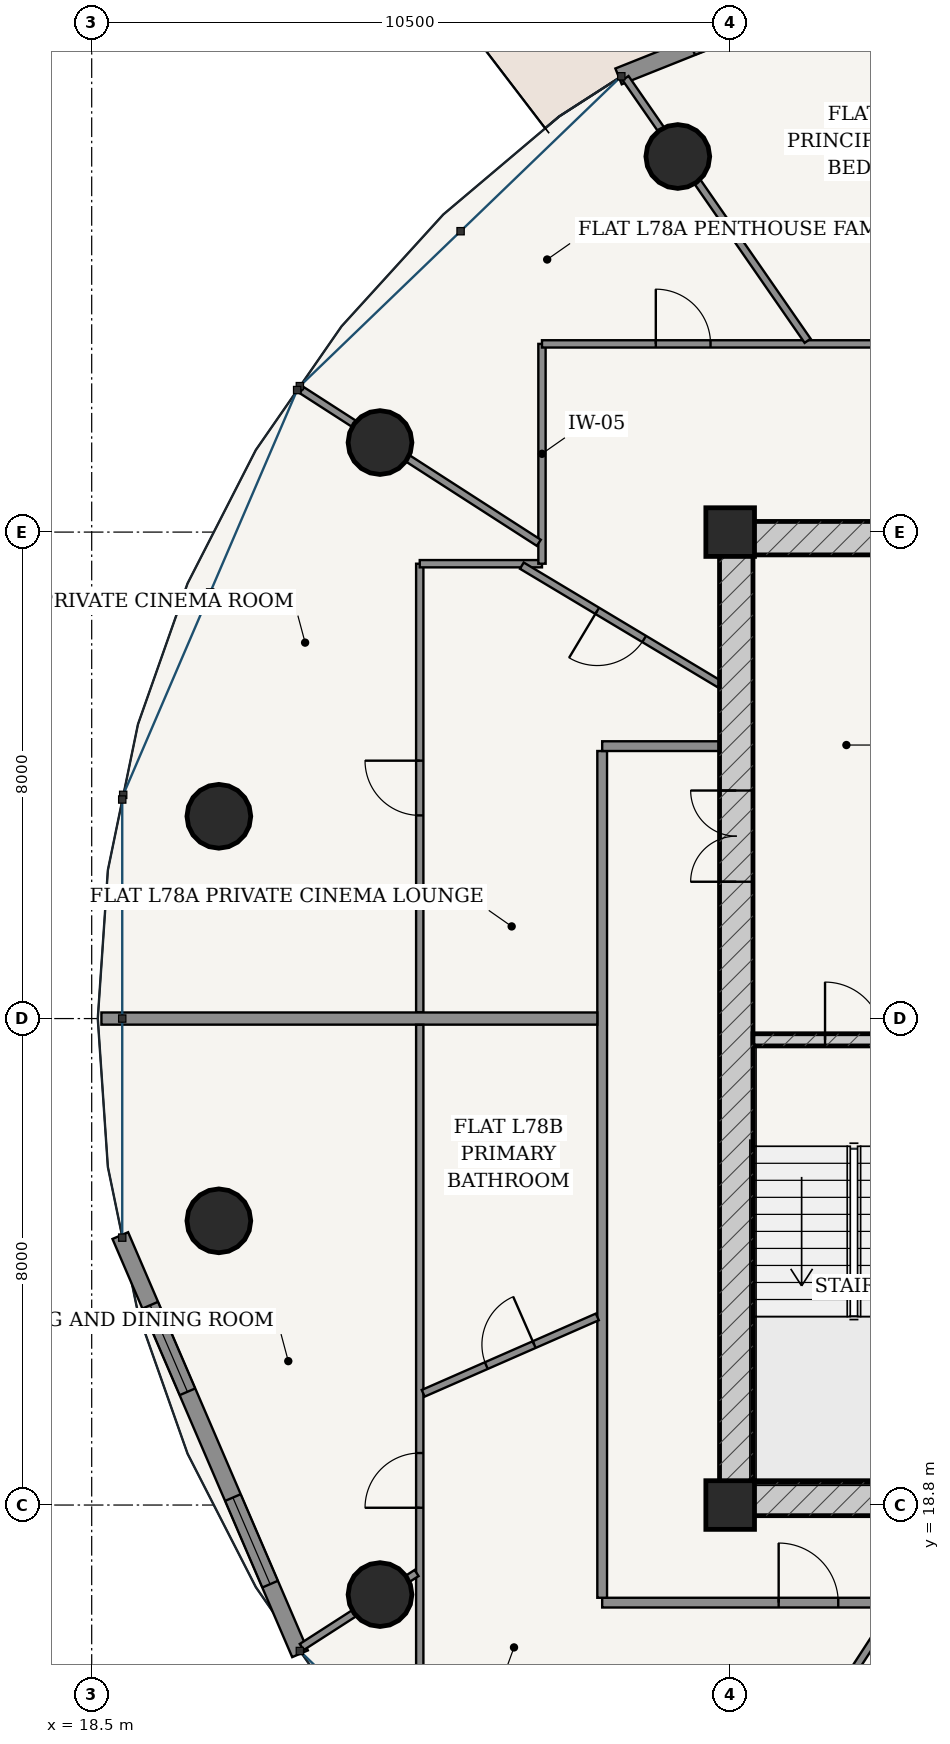
"""IFC4 building model, lengths in metres.
Left out: names, types, materials, properties, quantities, classifications, styles, units other than length and angle.
Written with IfcOpenShell. Run it as: python <this file> out.ifc"""

import sys

from ifc_helpers import new_model, si_unit, direction, frame, frame_2d, origin, origin_2d, place, context, subcontext, project, spatial, rectangle, hollow_circle, extrude, source, transform, mapped, element, fill, save


model = new_model("IFC4")
c1 = context("Model", 3, precision=1e-05, world=origin(), true_north=direction((-0.2419218956, 0.970295726276)))
c2 = subcontext(c1, "Body", "Model", "MODEL_VIEW")
j1 = project(units=[si_unit("LENGTHUNIT", "METRE"), si_unit("PLANEANGLEUNIT", "RADIAN")], contexts=[c1])
p1 = place(None, origin())
s1 = spatial("IfcSite", under=j1, at=p1, CompositionType="ELEMENT")
p2 = place(p1, origin())
s2 = spatial("IfcBuilding", under=s1, at=p2, CompositionType="ELEMENT")
p3 = place(p2, frame((0.0, 0.0, 296.95)))
s3 = spatial("IfcBuildingStorey", under=s2, at=p3, CompositionType="ELEMENT", Elevation=296.95)
for number, where, z_axis, x_axis in (
    (1, (29.0, 18.8, 0.0), (0.0, 0.0, 1.0), (1.0, 0.0, 0.0)),
    (2, (29.0, 34.8, 0.0), (0.0, 0.0, 1.0), (1.0, 0.0, 0.0)),
):
    element("IfcColumn", number, at=place(p3, frame(where, z_axis=z_axis, x_axis=x_axis)), inside=s3, PredefinedType="COLUMN", context=c2, shape_type="SweptSolid", body=[
        extrude(rectangle(XDim=0.8, YDim=0.8, at=origin_2d()), origin(), (0.0, 0.0, 1.0), 3.75),
    ])
p4 = place(p3, frame((28.825, 18.9, 0.0), z_axis=(0.0, 0.0, 1.0), x_axis=(1.0, 0.0, 0.0)))
e3 = element("IfcWall", 3, at=p4, inside=s3, PredefinedType="SHEAR", context=c2, shape_type="SweptSolid", body=[
    extrude(rectangle(XDim=18.35, YDim=0.55, at=frame_2d((9.175, 0.0))), origin(), (0.0, 0.0, 1.0), 3.3),
])
p5 = place(p4, frame((8.75, 0.0, 0.0)))
e4 = element("IfcOpeningElement", 4, at=p5, cuts=e3, PredefinedType="OPENING", context=c2, shape_type="SweptSolid", body=[
    extrude(rectangle(XDim=0.85, YDim=2.1, at=frame_2d((0.425, 1.05))), frame((0.0, 0.285, 0.0), z_axis=(0.0, -1.0, 0.0), x_axis=(1.0, 0.0, 0.0)), (0.0, 0.0, 1.0), 0.57),
])
p6 = place(p3, frame((28.825, 34.7, 0.0), z_axis=(0.0, 0.0, 1.0), x_axis=(1.0, 0.0, 0.0)))
e5 = element("IfcWall", 5, at=p6, inside=s3, PredefinedType="SHEAR", context=c2, shape_type="SweptSolid", body=[
    extrude(rectangle(XDim=18.35, YDim=0.55, at=frame_2d((9.175, 0.0))), origin(), (0.0, 0.0, 1.0), 3.3),
])
p7 = place(p3, frame((29.1, 19.175, 0.0), z_axis=(0.0, 0.0, 1.0), x_axis=(0.0, 1.0, 0.0)))
e6 = element("IfcWall", 6, at=p7, inside=s3, PredefinedType="SHEAR", context=c2, shape_type="SweptSolid", body=[
    extrude(rectangle(XDim=15.25, YDim=0.55, at=frame_2d((7.625, 0.0))), origin(), (0.0, 0.0, 1.0), 3.3),
])
p8 = place(p7, frame((9.875, 0.0, 0.0)))
e7 = element("IfcOpeningElement", 7, at=p8, cuts=e6, PredefinedType="OPENING", context=c2, shape_type="SweptSolid", body=[
    extrude(rectangle(XDim=1.5, YDim=2.2, at=frame_2d((0.75, 1.1))), frame((0.0, 0.285, 0.0), z_axis=(0.0, -1.0, 0.0), x_axis=(1.0, 0.0, 0.0)), (0.0, 0.0, 1.0), 0.57),
])
p9 = place(p3, frame((29.375, 26.45, 0.0), z_axis=(0.0, 0.0, 1.0), x_axis=(1.0, 0.0, 0.0)))
e8 = element("IfcWall", 8, at=p9, inside=s3, PredefinedType="SOLIDWALL", context=c2, shape_type="SweptSolid", body=[
    extrude(rectangle(XDim=3.32, YDim=0.2, at=frame_2d((1.66, 0.0))), origin(), (0.0, 0.0, 1.0), 3.3),
])
p10 = place(p9, frame((1.185, 0.0, 0.0)))
e9 = element("IfcOpeningElement", 9, at=p10, cuts=e8, PredefinedType="OPENING", context=c2, shape_type="SweptSolid", body=[
    extrude(rectangle(XDim=0.95, YDim=2.15, at=frame_2d((0.475, 1.075))), frame((0.0, 0.11, 0.0), z_axis=(0.0, -1.0, 0.0), x_axis=(1.0, 0.0, 0.0)), (0.0, 0.0, 1.0), 0.22),
])
for number, where, z_axis, x_axis in (
    (10, (28.139, 40.977, 0.0), (0.0, 0.0, 1.0), (1.0, 0.0, 0.0)),
    (11, (23.241, 36.272, 0.0), (0.0, 0.0, 1.0), (1.0, 0.0, 0.0)),
    (12, (20.591, 30.126, 0.0), (0.0, 0.0, 1.0), (1.0, 0.0, 0.0)),
    (13, (20.591, 23.474, 0.0), (0.0, 0.0, 1.0), (1.0, 0.0, 0.0)),
    (14, (23.241, 17.328, 0.0), (0.0, 0.0, 1.0), (1.0, 0.0, 0.0)),
):
    element("IfcColumn", number, at=place(p3, frame(where, z_axis=z_axis, x_axis=x_axis)), inside=s3, PredefinedType="COLUMN", context=c2, shape_type="SweptSolid", body=[
        extrude(hollow_circle(Radius=0.525, WallThickness=0.035, at=origin_2d()), origin(), (0.0, 0.0, 1.0), 3.75),
    ])
p11 = place(p3, frame((34.295, 45.141, 0.0), z_axis=(0.0, 0.0, 1.0), x_axis=(-0.928724272392, -0.370771123296, 0.0)))
e15 = element("IfcWall", 15, at=p11, inside=s3, PredefinedType="SOLIDWALL", context=c2, shape_type="SweptSolid", body=[
    extrude(rectangle(XDim=7.678, YDim=0.28, at=frame_2d((3.839, 0.0))), origin(), (0.0, 0.0, 1.0), 3.3),
])
p12 = place(p11, frame((1.298, 0.0, 0.85)))
e16 = element("IfcOpeningElement", 16, at=p12, cuts=e15, PredefinedType="OPENING", context=c2, shape_type="SweptSolid", body=[
    extrude(rectangle(XDim=1.55, YDim=1.95, at=frame_2d((0.775, 0.975))), frame((0.0, 0.15, 0.0), z_axis=(0.0, -1.0, 0.0), x_axis=(1.0, 0.0, 0.0)), (0.0, 0.0, 1.0), 0.3),
])
p13 = place(p11, frame((4.83, 0.0, 0.85)))
e17 = element("IfcOpeningElement", 17, at=p13, cuts=e15, PredefinedType="OPENING", context=c2, shape_type="SweptSolid", body=[
    extrude(rectangle(XDim=1.55, YDim=1.95, at=frame_2d((0.775, 0.975))), frame((0.0, 0.15, 0.0), z_axis=(0.0, -1.0, 0.0), x_axis=(1.0, 0.0, 0.0)), (0.0, 0.0, 1.0), 0.3),
])
p14 = place(p3, frame((18.971, 23.231, 0.0), z_axis=(0.0, 0.0, 1.0), x_axis=(0.394816612978, -0.918759948037, 0.0)))
e18 = element("IfcWall", 18, at=p14, inside=s3, PredefinedType="SOLIDWALL", context=c2, shape_type="SweptSolid", body=[
    extrude(rectangle(XDim=7.485, YDim=0.28, at=frame_2d((3.743, 0.0))), origin(), (0.0, 0.0, 1.0), 3.3),
])
p15 = place(p14, frame((1.246, 0.0, 0.85)))
e19 = element("IfcOpeningElement", 19, at=p15, cuts=e18, PredefinedType="OPENING", context=c2, shape_type="SweptSolid", body=[
    extrude(rectangle(XDim=1.55, YDim=1.95, at=frame_2d((0.775, 0.975))), frame((0.0, 0.15, 0.0), z_axis=(0.0, -1.0, 0.0), x_axis=(1.0, 0.0, 0.0)), (0.0, 0.0, 1.0), 0.3),
])
p16 = place(p14, frame((4.689, 0.0, 0.85)))
e20 = element("IfcOpeningElement", 20, at=p16, cuts=e18, PredefinedType="OPENING", context=c2, shape_type="SweptSolid", body=[
    extrude(rectangle(XDim=1.55, YDim=1.95, at=frame_2d((0.775, 0.975))), frame((0.0, 0.15, 0.0), z_axis=(0.0, -1.0, 0.0), x_axis=(1.0, 0.0, 0.0)), (0.0, 0.0, 1.0), 0.3),
])
p17 = place(p3, frame((26.895, 17.195, 0.0), z_axis=(0.0, 0.0, 1.0), x_axis=(1.0, 0.0, 0.0)))
e21 = element("IfcWall", 21, at=p17, inside=s3, PredefinedType="PARTITIONING", context=c2, shape_type="SweptSolid", body=[
    extrude(rectangle(XDim=22.21, YDim=0.16, at=frame_2d((11.105, 0.0))), origin(), (0.0, 0.0, 1.0), 2.825),
])
p18 = place(p17, frame((2.902, 0.0, 0.0)))
e22 = element("IfcOpeningElement", 22, at=p18, cuts=e21, PredefinedType="OPENING", context=c2, shape_type="SweptSolid", body=[
    extrude(rectangle(XDim=0.98, YDim=2.2, at=frame_2d((0.49, 1.1))), frame((0.0, 0.09, 0.0), z_axis=(0.0, -1.0, 0.0), x_axis=(1.0, 0.0, 0.0)), (0.0, 0.0, 1.0), 0.18),
])
p19 = place(p3, frame((26.895, 17.275, 0.0), z_axis=(0.0, 0.0, 1.0), x_axis=(0.0, 1.0, 0.0)))
e23 = element("IfcWall", 23, at=p19, inside=s3, PredefinedType="PARTITIONING", context=c2, shape_type="SweptSolid", body=[
    extrude(rectangle(XDim=13.925, YDim=0.16, at=frame_2d((6.962, 0.0))), origin(), (0.0, 0.0, 1.0), 2.825),
])
p20 = place(p3, frame((26.895, 31.28, 0.0), z_axis=(0.0, 0.0, 1.0), x_axis=(1.0, 0.0, 0.0)))
e24 = element("IfcWall", 24, at=p20, inside=s3, PredefinedType="PARTITIONING", context=c2, shape_type="SweptSolid", body=[
    extrude(rectangle(XDim=1.93, YDim=0.16, at=frame_2d((0.965, 0.0))), origin(), (0.0, 0.0, 1.0), 3.3),
])
p21 = place(p3, frame((23.895, 26.902, 0.0), z_axis=(0.0, 0.0, 1.0), x_axis=(0.0, 1.0, 0.0)))
e25 = element("IfcWall", 25, at=p21, inside=s3, PredefinedType="PARTITIONING", context=c2, shape_type="SweptSolid", body=[
    extrude(rectangle(XDim=7.378, YDim=0.12, at=frame_2d((3.689, 0.0))), origin(), (0.0, 0.0, 1.0), 2.825),
])
p22 = place(p21, frame((3.239, 0.0, 0.0)))
e26 = element("IfcOpeningElement", 26, at=p22, cuts=e25, PredefinedType="OPENING", context=c2, shape_type="SweptSolid", body=[
    extrude(rectangle(XDim=0.9, YDim=2.15, at=frame_2d((0.45, 1.075))), frame((0.0, 0.07, 0.0), z_axis=(0.0, -1.0, 0.0), x_axis=(1.0, 0.0, 0.0)), (0.0, 0.0, 1.0), 0.14),
])
p23 = place(p3, frame((23.895, 34.28, 0.0), z_axis=(0.0, 0.0, 1.0), x_axis=(1.0, 0.0, 0.0)))
e27 = element("IfcWall", 27, at=p23, inside=s3, PredefinedType="PARTITIONING", context=c2, shape_type="SweptSolid", body=[
    extrude(rectangle(XDim=2.01, YDim=0.12, at=frame_2d((1.005, 0.0))), origin(), (0.0, 0.0, 1.0), 3.3),
])
p24 = place(p3, frame((25.905, 34.28, 0.0), z_axis=(0.0, 0.0, 1.0), x_axis=(0.0, 1.0, 0.0)))
e28 = element("IfcWall", 28, at=p24, inside=s3, PredefinedType="PARTITIONING", context=c2, shape_type="SweptSolid", body=[
    extrude(rectangle(XDim=3.615, YDim=0.12, at=frame_2d((1.808, 0.0))), origin(), (0.0, 0.0, 1.0), 2.825),
])
p25 = place(p3, frame((25.905, 37.895, 0.0), z_axis=(0.0, 0.0, 1.0), x_axis=(1.0, 0.0, 0.0)))
e29 = element("IfcWall", 29, at=p25, inside=s3, PredefinedType="PARTITIONING", context=c2, shape_type="SweptSolid", body=[
    extrude(rectangle(XDim=24.19, YDim=0.12, at=frame_2d((12.095, 0.0))), origin(), (0.0, 0.0, 1.0), 2.825),
])
p26 = place(p25, frame((21.621, 0.0, 0.0)))
e30 = element("IfcOpeningElement", 30, at=p26, cuts=e29, PredefinedType="OPENING", context=c2, shape_type="SweptSolid", body=[
    extrude(rectangle(XDim=0.9, YDim=2.15, at=frame_2d((0.45, 1.075))), frame((0.0, 0.07, 0.0), z_axis=(0.0, -1.0, 0.0), x_axis=(1.0, 0.0, 0.0)), (0.0, 0.0, 1.0), 0.14),
])
p27 = place(p25, frame((16.661, 0.0, 0.0)))
e31 = element("IfcOpeningElement", 31, at=p27, cuts=e29, PredefinedType="OPENING", context=c2, shape_type="SweptSolid", body=[
    extrude(rectangle(XDim=0.9, YDim=2.15, at=frame_2d((0.45, 1.075))), frame((0.0, 0.07, 0.0), z_axis=(0.0, -1.0, 0.0), x_axis=(1.0, 0.0, 0.0)), (0.0, 0.0, 1.0), 0.14),
])
p28 = place(p25, frame((1.872, 0.0, 0.0)))
e32 = element("IfcOpeningElement", 32, at=p28, cuts=e29, PredefinedType="OPENING", context=c2, shape_type="SweptSolid", body=[
    extrude(rectangle(XDim=0.9, YDim=2.15, at=frame_2d((0.45, 1.075))), frame((0.0, 0.07, 0.0), z_axis=(0.0, -1.0, 0.0), x_axis=(1.0, 0.0, 0.0)), (0.0, 0.0, 1.0), 0.14),
])
p29 = place(p3, frame((30.274, 37.946, 0.0), z_axis=(0.0, 0.0, 1.0), x_axis=(-0.569678410446, 0.821867695357, 0.0)))
e33 = element("IfcWall", 33, at=p29, inside=s3, PredefinedType="PARTITIONING", context=c2, shape_type="SweptSolid", body=[
    extrude(rectangle(XDim=5.257, YDim=0.12, at=frame_2d((2.628, 0.0))), origin(), (0.0, 0.0, 1.0), 2.65),
])
p30 = place(p3, frame((25.853, 34.624, 0.0), z_axis=(0.0, 0.0, 1.0), x_axis=(-0.840694066929, 0.541510374628, 0.0)))
e34 = element("IfcWall", 34, at=p30, inside=s3, PredefinedType="PARTITIONING", context=c2, shape_type="SweptSolid", body=[
    extrude(rectangle(XDim=4.637, YDim=0.12, at=frame_2d((2.319, 0.0))), origin(), (0.0, 0.0, 1.0), 2.65),
])
p31 = place(p3, frame((28.825, 32.3, 0.0), z_axis=(0.0, 0.0, 1.0), x_axis=(-0.857737223377, 0.514088373369, 0.0)))
e35 = element("IfcWall", 35, at=p31, inside=s3, PredefinedType="PARTITIONING", context=c2, shape_type="SweptSolid", body=[
    extrude(rectangle(XDim=3.79, YDim=0.12, at=frame_2d((1.895, 0.0))), origin(), (0.0, 0.0, 1.0), 3.019),
])
p32 = place(p31, frame((1.445, 0.0, 0.0)))
e36 = element("IfcOpeningElement", 36, at=p32, cuts=e35, PredefinedType="OPENING", context=c2, shape_type="SweptSolid", body=[
    extrude(rectangle(XDim=0.9, YDim=2.15, at=frame_2d((0.45, 1.075))), frame((0.0, 0.07, 0.0), z_axis=(0.0, -1.0, 0.0), x_axis=(1.0, 0.0, 0.0)), (0.0, 0.0, 1.0), 0.14),
])
p33 = place(p3, frame((26.815, 26.8, 0.0), z_axis=(0.0, 0.0, 1.0), x_axis=(-1.0, 0.0, 0.0)))
e37 = element("IfcWall", 37, at=p33, inside=s3, PredefinedType="PARTITIONING", context=c2, shape_type="SweptSolid", body=[
    extrude(rectangle(XDim=8.155, YDim=0.2, at=frame_2d((4.078, 0.0))), origin(), (0.0, 0.0, 1.0), 2.931),
])
p34 = place(p3, frame((23.895, 14.388, 0.0), z_axis=(0.0, 0.0, 1.0), x_axis=(0.0, 1.0, 0.0)))
e38 = element("IfcWall", 38, at=p34, inside=s3, PredefinedType="PARTITIONING", context=c2, shape_type="SweptSolid", body=[
    extrude(rectangle(XDim=12.31, YDim=0.12, at=frame_2d((6.155, 0.0))), origin(), (0.0, 0.0, 1.0), 2.65),
])
p35 = place(p34, frame((4.367, 0.0, 0.0)))
e39 = element("IfcOpeningElement", 39, at=p35, cuts=e38, PredefinedType="OPENING", context=c2, shape_type="SweptSolid", body=[
    extrude(rectangle(XDim=0.9, YDim=2.15, at=frame_2d((0.45, 1.075))), frame((0.0, 0.07, 0.0), z_axis=(0.0, -1.0, 0.0), x_axis=(1.0, 0.0, 0.0)), (0.0, 0.0, 1.0), 0.14),
])
p36 = place(p3, frame((23.843, 17.682, 0.0), z_axis=(0.0, 0.0, 1.0), x_axis=(-0.840690872836, -0.541515333421, 0.0)))
e40 = element("IfcWall", 40, at=p36, inside=s3, PredefinedType="PARTITIONING", context=c2, shape_type="SweptSolid", body=[
    extrude(rectangle(XDim=2.247, YDim=0.12, at=frame_2d((1.123, 0.0))), origin(), (0.0, 0.0, 1.0), 2.65),
])
p37 = place(p3, frame((26.815, 21.894, 0.0), z_axis=(0.0, 0.0, 1.0), x_axis=(-0.915755452884, -0.401736170284, 0.0)))
e41 = element("IfcWall", 41, at=p37, inside=s3, PredefinedType="PARTITIONING", context=c2, shape_type="SweptSolid", body=[
    extrude(rectangle(XDim=3.127, YDim=0.12, at=frame_2d((1.563, 0.0))), origin(), (0.0, 0.0, 1.0), 3.019),
])
p38 = place(p37, frame((1.133, 0.0, 0.0)))
e42 = element("IfcOpeningElement", 42, at=p38, cuts=e41, PredefinedType="OPENING", context=c2, shape_type="SweptSolid", body=[
    extrude(rectangle(XDim=0.86, YDim=2.15, at=frame_2d((0.43, 1.075))), frame((0.0, 0.07, 0.0), z_axis=(0.0, -1.0, 0.0), x_axis=(1.0, 0.0, 0.0)), (0.0, 0.0, 1.0), 0.14),
])
p39 = place(p3, frame((31.706, 17.115, 0.0), z_axis=(0.0, 0.0, 1.0), x_axis=(-0.544910571015, -0.838494167896, 0.0)))
e43 = element("IfcWall", 43, at=p39, inside=s3, PredefinedType="PARTITIONING", context=c2, shape_type="SweptSolid", body=[
    extrude(rectangle(XDim=3.42, YDim=0.12, at=frame_2d((1.71, 0.0))), origin(), (0.0, 0.0, 1.0), 3.019),
])
p40 = place(p39, frame((1.26, 0.0, 0.0)))
e44 = element("IfcOpeningElement", 44, at=p40, cuts=e43, PredefinedType="OPENING", context=c2, shape_type="SweptSolid", body=[
    extrude(rectangle(XDim=0.9, YDim=2.15, at=frame_2d((0.45, 1.075))), frame((0.0, 0.07, 0.0), z_axis=(0.0, -1.0, 0.0), x_axis=(1.0, 0.0, 0.0)), (0.0, 0.0, 1.0), 0.14),
])
m1 = source(origin(), c2, "Body", "SweptSolid", [
    extrude(rectangle(XDim=1.55, YDim=1.95, at=frame_2d((0.775, 0.975))), frame((0.0, 0.03, 0.0), z_axis=(0.0, -1.0, 0.0), x_axis=(1.0, 0.0, 0.0)), (0.0, 0.0, 1.0), 0.06),
])
p41 = place(p15, origin())
e45 = element("IfcWindow", 45, at=p41, inside=s3, PartitioningType="SINGLE_PANEL", PredefinedType="WINDOW", context=c2, shape_type="MappedRepresentation", body=[
    mapped(m1, transform((0.0, 0.0, 0.0), scale=1.0)),
])
fill(e19, e45)
p42 = place(p16, origin())
e46 = element("IfcWindow", 46, at=p42, inside=s3, PartitioningType="SINGLE_PANEL", PredefinedType="WINDOW", context=c2, shape_type="MappedRepresentation", body=[
    mapped(m1, transform((0.0, 0.0, 0.0), scale=1.0)),
])
fill(e20, e46)
m2 = source(origin(), c2, "Body", "SweptSolid", [
    extrude(rectangle(XDim=1.5, YDim=2.2, at=frame_2d((0.75, 1.1))), frame((0.0, 0.025, 0.0), z_axis=(0.0, -1.0, 0.0), x_axis=(1.0, 0.0, 0.0)), (0.0, 0.0, 1.0), 0.05),
])
p43 = place(p8, origin())
e47 = element("IfcDoor", 47, at=p43, inside=s3, OperationType="DOUBLE_DOOR_SINGLE_SWING", PredefinedType="DOOR", context=c2, shape_type="MappedRepresentation", body=[
    mapped(m2, transform((0.0, 0.0, 0.0), scale=1.0)),
])
fill(e7, e47)
m3 = source(origin(), c2, "Body", "SweptSolid", [
    extrude(rectangle(XDim=0.95, YDim=2.15, at=frame_2d((0.475, 1.075))), frame((0.0, 0.025, 0.0), z_axis=(0.0, -1.0, 0.0), x_axis=(1.0, 0.0, 0.0)), (0.0, 0.0, 1.0), 0.05),
])
p44 = place(p10, origin())
e48 = element("IfcDoor", 48, at=p44, inside=s3, OperationType="SINGLE_SWING_LEFT", PredefinedType="DOOR", context=c2, shape_type="MappedRepresentation", body=[
    mapped(m3, transform((0.0, 0.0, 0.0), scale=1.0)),
])
fill(e9, e48)
m4 = source(origin(), c2, "Body", "SweptSolid", [
    extrude(rectangle(XDim=0.9, YDim=2.15, at=frame_2d((0.45, 1.075))), frame((0.0, 0.025, 0.0), z_axis=(0.0, -1.0, 0.0), x_axis=(1.0, 0.0, 0.0)), (0.0, 0.0, 1.0), 0.05),
])
p45 = place(p32, origin())
e49 = element("IfcDoor", 49, at=p45, inside=s3, OperationType="SINGLE_SWING_RIGHT", PredefinedType="DOOR", context=c2, shape_type="MappedRepresentation", body=[
    mapped(m4, transform((0.0, 0.0, 0.0), scale=1.0)),
])
fill(e36, e49)
p46 = place(p28, origin())
e50 = element("IfcDoor", 50, at=p46, inside=s3, OperationType="SINGLE_SWING_LEFT", PredefinedType="DOOR", context=c2, shape_type="MappedRepresentation", body=[
    mapped(m4, transform((0.0, 0.0, 0.0), scale=1.0)),
])
fill(e32, e50)
p47 = place(p22, origin())
e51 = element("IfcDoor", 51, at=p47, inside=s3, OperationType="SINGLE_SWING_RIGHT", PredefinedType="DOOR", context=c2, shape_type="MappedRepresentation", body=[
    mapped(m4, transform((0.0, 0.0, 0.0), scale=1.0)),
])
fill(e26, e51)
m5 = source(origin(), c2, "Body", "SweptSolid", [
    extrude(rectangle(XDim=0.98, YDim=2.2, at=frame_2d((0.49, 1.1))), frame((0.0, 0.025, 0.0), z_axis=(0.0, -1.0, 0.0), x_axis=(1.0, 0.0, 0.0)), (0.0, 0.0, 1.0), 0.05),
])
p48 = place(p18, origin())
e52 = element("IfcDoor", 52, at=p48, inside=s3, OperationType="SINGLE_SWING_LEFT", PredefinedType="DOOR", context=c2, shape_type="MappedRepresentation", body=[
    mapped(m5, transform((0.0, 0.0, 0.0), scale=1.0)),
])
fill(e22, e52)
m6 = source(origin(), c2, "Body", "SweptSolid", [
    extrude(rectangle(XDim=0.86, YDim=2.15, at=frame_2d((0.43, 1.075))), frame((0.0, 0.025, 0.0), z_axis=(0.0, -1.0, 0.0), x_axis=(1.0, 0.0, 0.0)), (0.0, 0.0, 1.0), 0.05),
])
p49 = place(p38, frame((0.86, 0.0, 0.0), z_axis=(0.0, 0.0, 1.0), x_axis=(-1.0, 0.0, 0.0)))
e53 = element("IfcDoor", 53, at=p49, inside=s3, OperationType="SINGLE_SWING_RIGHT", PredefinedType="DOOR", context=c2, shape_type="MappedRepresentation", body=[
    mapped(m6, transform((0.0, 0.0, 0.0), scale=1.0)),
])
fill(e42, e53)
p50 = place(p35, origin())
e54 = element("IfcDoor", 54, at=p50, inside=s3, OperationType="SINGLE_SWING_LEFT", PredefinedType="DOOR", context=c2, shape_type="MappedRepresentation", body=[
    mapped(m4, transform((0.0, 0.0, 0.0), scale=1.0)),
])
fill(e39, e54)
save(model, sys.argv[1])
